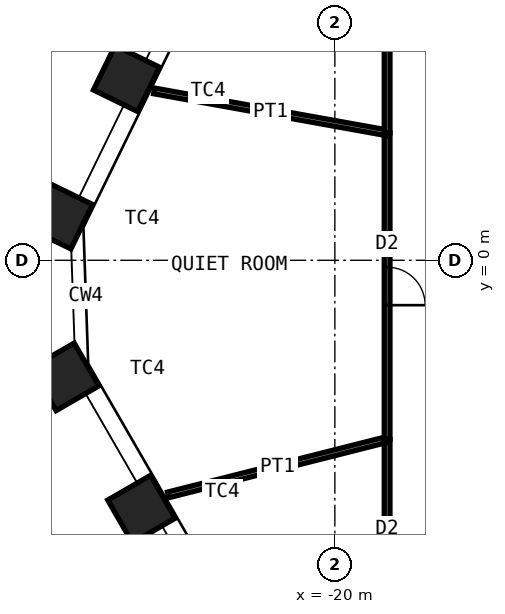
"""IFC4 building model, lengths in metres.
Left out: names, types, materials, properties, quantities, classifications, styles, units other than length and angle.
Written with IfcOpenShell. Run it as: python <this file> out.ifc"""

import sys

from ifc_helpers import new_model, si_unit, direction, frame, frame_2d, origin, origin_2d, place, context, subcontext, project, spatial, rectangle, hollow_rectangle, extrude, element, fill, save


model = new_model("IFC4")
c1 = context("Model", 3, precision=1e-05, world=origin(), true_north=direction((0.0, 1.0)))
c2 = subcontext(c1, "Body", "Model", "MODEL_VIEW")
j1 = project(units=[si_unit("LENGTHUNIT", "METRE"), si_unit("PLANEANGLEUNIT", "RADIAN")], contexts=[c1])
p1 = place(None, origin())
s1 = spatial("IfcSite", under=j1, at=p1, CompositionType="ELEMENT")
p2 = place(p1, origin())
s2 = spatial("IfcBuilding", under=s1, at=p2, CompositionType="ELEMENT")
p3 = place(p2, frame((0.0, 0.0, 153.4)))
s3 = spatial("IfcBuildingStorey", under=s2, at=p3, CompositionType="ELEMENT", Elevation=153.4)
for number, where, z_axis, x_axis in (
    (1, (-25.087, -6.547, 0.0), (0.0, 0.0, 1.0), (0.5, -0.866, 0.0)),
    (2, (-27.097, -3.067, 0.0), (0.0, 0.0, 1.0), (0.5, -0.866, 0.0)),
    (3, (-27.245, 1.169, 0.0), (0.0, 0.0, 1.0), (-0.438, -0.899, 0.0)),
    (4, (-25.483, 4.781, 0.0), (0.0, 0.0, 1.0), (-0.438, -0.899, 0.0)),
):
    element("IfcColumn", number, at=place(p3, frame(where, z_axis=z_axis, x_axis=x_axis)), inside=s3, PredefinedType="COLUMN", context=c2, shape_type="SweptSolid", body=[
        extrude(hollow_rectangle(XDim=1.3, YDim=1.3, WallThickness=0.1, at=origin_2d()), origin(), (0.0, 0.0, 1.0), 4.2),
    ])
p4 = place(p3, frame((-18.625, -11.625, 0.0), z_axis=(0.0, 0.0, 1.0), x_axis=(0.0, 1.0, 0.0)))
e5 = element("IfcWall", 5, at=p4, inside=s3, PredefinedType="PARTITIONING", context=c2, shape_type="SweptSolid", body=[
    extrude(rectangle(XDim=6.91, YDim=0.15, at=frame_2d((3.455, 0.0))), origin(), (0.0, 0.0, 1.0), 4.03),
])
p5 = place(p4, frame((2.955, 0.0, 0.0)))
e6 = element("IfcOpeningElement", 6, at=p5, cuts=e5, PredefinedType="OPENING", context=c2, shape_type="SweptSolid", body=[
    extrude(rectangle(XDim=1.0, YDim=2.4, at=frame_2d((0.5, 1.2))), frame((0.0, 0.085, 0.0), z_axis=(0.0, -1.0, 0.0), x_axis=(1.0, 0.0, 0.0)), (0.0, 0.0, 1.0), 0.17),
])
p6 = place(p3, frame((-24.384, -6.173, 0.0), z_axis=(0.0, 0.0, 1.0), x_axis=(0.969427635767, 0.245377380804, 0.0)))
e7 = element("IfcWall", 7, at=p6, inside=s3, PredefinedType="PARTITIONING", context=c2, shape_type="SweptSolid", body=[
    extrude(rectangle(XDim=5.941, YDim=0.15, at=frame_2d((2.97, 0.0))), origin(), (0.0, 0.0, 1.0), 3.33),
])
p7 = place(p3, frame((-18.625, -4.715, 0.0), z_axis=(0.0, 0.0, 1.0), x_axis=(0.0, 1.0, 0.0)))
e8 = element("IfcWall", 8, at=p7, inside=s3, PredefinedType="PARTITIONING", context=c2, shape_type="SweptSolid", body=[
    extrude(rectangle(XDim=8.068, YDim=0.15, at=frame_2d((4.034, 0.0))), origin(), (0.0, 0.0, 1.0), 4.03),
])
p8 = place(p7, frame((3.534, 0.0, 0.0)))
e9 = element("IfcOpeningElement", 9, at=p8, cuts=e8, PredefinedType="OPENING", context=c2, shape_type="SweptSolid", body=[
    extrude(rectangle(XDim=1.0, YDim=2.4, at=frame_2d((0.5, 1.2))), frame((0.0, 0.085, 0.0), z_axis=(0.0, -1.0, 0.0), x_axis=(1.0, 0.0, 0.0)), (0.0, 0.0, 1.0), 0.17),
])
p9 = place(p3, frame((-24.755, 4.457, 0.0), z_axis=(0.0, 0.0, 1.0), x_axis=(0.984175122587, -0.177198555524, 0.0)))
e10 = element("IfcWall", 10, at=p9, inside=s3, PredefinedType="PARTITIONING", context=c2, shape_type="SweptSolid", body=[
    extrude(rectangle(XDim=6.229, YDim=0.15, at=frame_2d((3.115, 0.0))), origin(), (0.0, 0.0, 1.0), 3.33),
])
p10 = place(p3, frame((-18.625, 3.353, 0.0), z_axis=(0.0, 0.0, 1.0), x_axis=(0.0, 1.0, 0.0)))
e11 = element("IfcWall", 11, at=p10, inside=s3, PredefinedType="PARTITIONING", context=c2, shape_type="SweptSolid", body=[
    extrude(rectangle(XDim=8.272, YDim=0.15, at=frame_2d((4.136, 0.0))), origin(), (0.0, 0.0, 1.0), 4.03),
])
p11 = place(p10, frame((3.236, 0.0, 0.0)))
e12 = element("IfcOpeningElement", 12, at=p11, cuts=e11, PredefinedType="OPENING", context=c2, shape_type="SweptSolid", body=[
    extrude(rectangle(XDim=1.8, YDim=2.4, at=frame_2d((0.9, 1.2))), frame((0.0, 0.085, 0.0), z_axis=(0.0, -1.0, 0.0), x_axis=(1.0, 0.0, 0.0)), (0.0, 0.0, 1.0), 0.17),
])
p12 = place(p8, origin())
e13 = element("IfcDoor", 13, at=p12, inside=s3, OperationType="SINGLE_SWING_LEFT", PredefinedType="DOOR", context=c2, shape_type="SweptSolid", body=[
    extrude(rectangle(XDim=1.0, YDim=2.4, at=frame_2d((0.5, 1.2))), frame((0.0, 0.025, 0.0), z_axis=(0.0, -1.0, 0.0), x_axis=(1.0, 0.0, 0.0)), (0.0, 0.0, 1.0), 0.05),
])
fill(e9, e13)
save(model, sys.argv[1])
